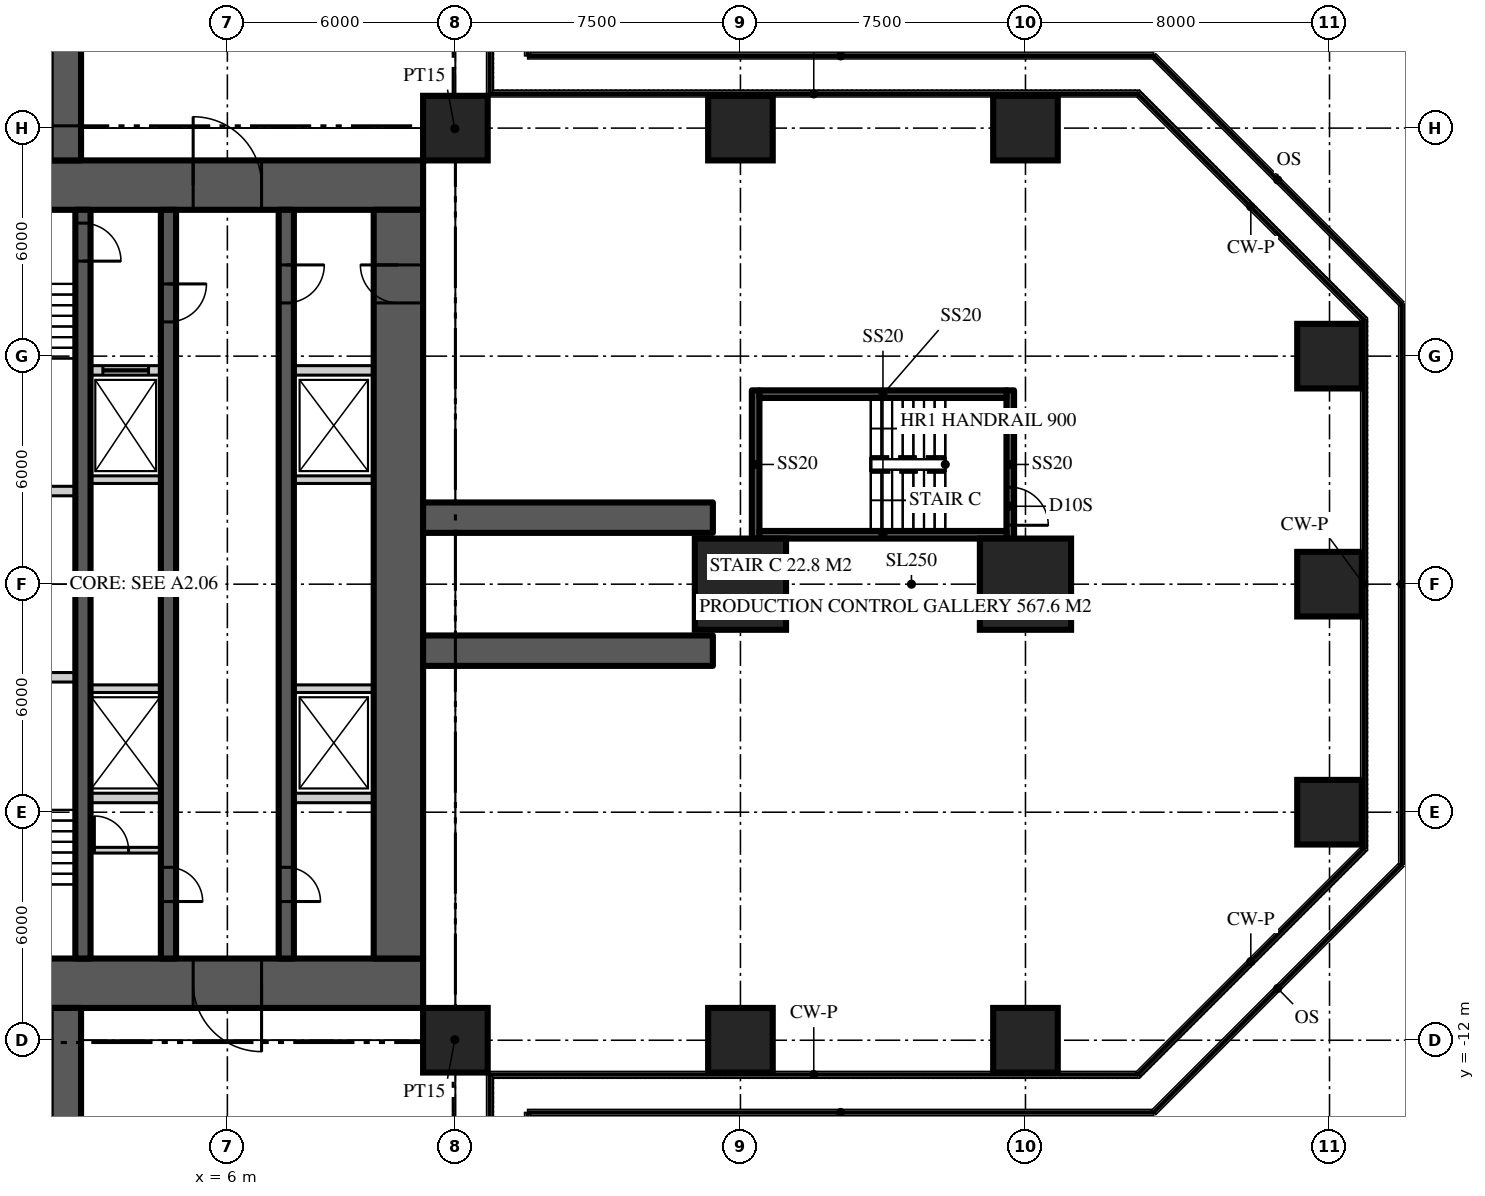
"""IFC4 building model, lengths in metres.
Left out: names, types, materials, properties, quantities, classifications, styles, units other than length and angle.
Written with IfcOpenShell. Run it as: python <this file> out.ifc"""

import sys

from ifc_helpers import new_model, si_unit, direction, frame, frame_2d, origin, origin_2d, place, context, subcontext, project, spatial, rectangle, extrude, element, fill, save


model = new_model("IFC4")
c1 = context("Model", 3, precision=1e-05, world=origin(), true_north=direction((0.0, 1.0)))
c2 = subcontext(c1, "Body", "Model", "MODEL_VIEW")
j1 = project(units=[si_unit("LENGTHUNIT", "METRE"), si_unit("PLANEANGLEUNIT", "RADIAN")], contexts=[c1])
p1 = place(None, origin())
s1 = spatial("IfcSite", under=j1, at=p1, CompositionType="ELEMENT")
p2 = place(p1, origin())
s2 = spatial("IfcBuilding", under=s1, at=p2, CompositionType="ELEMENT")
p3 = place(p2, frame((0.0, 0.0, 23.0)))
s3 = spatial("IfcBuildingStorey", under=s2, at=p3, CompositionType="ELEMENT", Elevation=23.0)
p4 = place(p3, frame((-11.15, 10.5, 0.0), z_axis=(0.0, 0.0, 1.0), x_axis=(1.0, 0.0, 0.0)))
e1 = element("IfcWall", 1, at=p4, inside=s3, PredefinedType="SHEAR", context=c2, shape_type="SweptSolid", body=[
    extrude(rectangle(XDim=22.3, YDim=1.3, at=frame_2d((11.15, 0.0))), origin(), (0.0, 0.0, 1.0), 5.0),
])
p5 = place(p4, frame((4.25, 0.0, 0.0)))
e2 = element("IfcOpeningElement", 2, at=p5, cuts=e1, PredefinedType="OPENING", context=c2, shape_type="SweptSolid", body=[
    extrude(rectangle(XDim=1.8, YDim=2.2, at=frame_2d((0.9, 1.1))), frame((0.0, 0.66, 0.0), z_axis=(0.0, -1.0, 0.0), x_axis=(1.0, 0.0, 0.0)), (0.0, 0.0, 1.0), 1.32),
])
p6 = place(p4, frame((16.25, 0.0, 0.0)))
e3 = element("IfcOpeningElement", 3, at=p6, cuts=e1, PredefinedType="OPENING", context=c2, shape_type="SweptSolid", body=[
    extrude(rectangle(XDim=1.8, YDim=2.2, at=frame_2d((0.9, 1.1))), frame((0.0, 0.66, 0.0), z_axis=(0.0, -1.0, 0.0), x_axis=(1.0, 0.0, 0.0)), (0.0, 0.0, 1.0), 1.32),
])
p7 = place(p3, frame((11.15, -10.5, 0.0), z_axis=(0.0, 0.0, 1.0), x_axis=(-1.0, 0.0, 0.0)))
e4 = element("IfcWall", 4, at=p7, inside=s3, PredefinedType="SHEAR", context=c2, shape_type="SweptSolid", body=[
    extrude(rectangle(XDim=22.3, YDim=1.3, at=frame_2d((11.15, 0.0))), origin(), (0.0, 0.0, 1.0), 5.0),
])
p8 = place(p7, frame((16.25, 0.0, 0.0)))
e5 = element("IfcOpeningElement", 5, at=p8, cuts=e4, PredefinedType="OPENING", context=c2, shape_type="SweptSolid", body=[
    extrude(rectangle(XDim=1.8, YDim=2.2, at=frame_2d((0.9, 1.1))), frame((0.0, 0.66, 0.0), z_axis=(0.0, -1.0, 0.0), x_axis=(1.0, 0.0, 0.0)), (0.0, 0.0, 1.0), 1.32),
])
p9 = place(p7, frame((4.25, 0.0, 0.0)))
e6 = element("IfcOpeningElement", 6, at=p9, cuts=e4, PredefinedType="OPENING", context=c2, shape_type="SweptSolid", body=[
    extrude(rectangle(XDim=1.8, YDim=2.2, at=frame_2d((0.9, 1.1))), frame((0.0, 0.66, 0.0), z_axis=(0.0, -1.0, 0.0), x_axis=(1.0, 0.0, 0.0)), (0.0, 0.0, 1.0), 1.32),
])
p10 = place(p3, frame((10.5, -9.85, 0.0), z_axis=(0.0, 0.0, 1.0), x_axis=(0.0, 1.0, 0.0)))
e7 = element("IfcWall", 7, at=p10, inside=s3, PredefinedType="SHEAR", context=c2, shape_type="SweptSolid", body=[
    extrude(rectangle(XDim=19.7, YDim=1.3, at=frame_2d((9.85, 0.0))), origin(), (0.0, 0.0, 1.0), 5.0),
])
p11 = place(p10, frame((17.25, 0.0, 0.0)))
e8 = element("IfcOpeningElement", 8, at=p11, cuts=e7, PredefinedType="OPENING", context=c2, shape_type="SweptSolid", body=[
    extrude(rectangle(XDim=1.0, YDim=2.2, at=frame_2d((0.5, 1.1))), frame((0.0, 0.66, 0.0), z_axis=(0.0, -1.0, 0.0), x_axis=(1.0, 0.0, 0.0)), (0.0, 0.0, 1.0), 1.32),
])
for number, where, z_axis, x_axis in (
    (9, (11.15, -1.75, 0.0), (0.0, 0.0, 1.0), (1.0, 0.0, 0.0)),
    (10, (11.15, 1.75, 0.0), (0.0, 0.0, 1.0), (1.0, 0.0, 0.0)),
    (11, (1.75, 11.15, 0.0), (0.0, 0.0, 1.0), (0.0, 1.0, 0.0)),
    (12, (1.75, -11.15, 0.0), (0.0, 0.0, 1.0), (0.0, -1.0, 0.0)),
):
    element("IfcWall", number, at=place(p3, frame(where, z_axis=z_axis, x_axis=x_axis)), inside=s3, PredefinedType="SHEAR", context=c2, shape_type="SweptSolid", body=[
        extrude(rectangle(XDim=7.625, YDim=0.8, at=frame_2d((3.812, 0.0))), origin(), (0.0, 0.0, 1.0), 5.0),
    ])
for number, where, z_axis, x_axis in (
    (13, (12.0, -12.0, 0.0), (0.0, 0.0, 1.0), (1.0, 0.0, 0.0)),
    (14, (19.5, -12.0, 0.0), (0.0, 0.0, 1.0), (1.0, 0.0, 0.0)),
    (15, (27.0, -12.0, 0.0), (0.0, 0.0, 1.0), (1.0, 0.0, 0.0)),
    (16, (35.0, -6.0, 0.0), (0.0, 0.0, 1.0), (1.0, 0.0, 0.0)),
):
    element("IfcColumn", number, at=place(p3, frame(where, z_axis=z_axis, x_axis=x_axis)), inside=s3, PredefinedType="COLUMN", context=c2, shape_type="SweptSolid", body=[
        extrude(rectangle(XDim=1.7, YDim=1.7, at=origin_2d()), origin(), (0.0, 0.0, 1.0), 5.0),
    ])
for number, where, z_axis, x_axis in (
    (17, (19.5, 0.0, 0.0), (0.0, 0.0, 1.0), (1.0, 0.0, 0.0)),
    (18, (27.0, 0.0, 0.0), (0.0, 0.0, 1.0), (1.0, 0.0, 0.0)),
):
    element("IfcColumn", number, at=place(p3, frame(where, z_axis=z_axis, x_axis=x_axis)), inside=s3, PredefinedType="COLUMN", context=c2, shape_type="SweptSolid", body=[
        extrude(rectangle(XDim=2.4, YDim=2.4, at=origin_2d()), origin(), (0.0, 0.0, 1.0), 5.0),
    ])
for number, where, z_axis, x_axis in (
    (19, (35.0, 0.0, 0.0), (0.0, 0.0, 1.0), (1.0, 0.0, 0.0)),
    (20, (35.0, 6.0, 0.0), (0.0, 0.0, 1.0), (1.0, 0.0, 0.0)),
    (21, (12.0, 12.0, 0.0), (0.0, 0.0, 1.0), (1.0, 0.0, 0.0)),
    (22, (19.5, 12.0, 0.0), (0.0, 0.0, 1.0), (1.0, 0.0, 0.0)),
    (23, (27.0, 12.0, 0.0), (0.0, 0.0, 1.0), (1.0, 0.0, 0.0)),
):
    element("IfcColumn", number, at=place(p3, frame(where, z_axis=z_axis, x_axis=x_axis)), inside=s3, PredefinedType="COLUMN", context=c2, shape_type="SweptSolid", body=[
        extrude(rectangle(XDim=1.7, YDim=1.7, at=origin_2d()), origin(), (0.0, 0.0, 1.0), 5.0),
    ])
p12 = place(p3, frame((7.55, 9.85, 0.0), z_axis=(0.0, 0.0, 1.0), x_axis=(0.0, -1.0, 0.0)))
e24 = element("IfcWall", 24, at=p12, inside=s3, PredefinedType="SHEAR", context=c2, shape_type="SweptSolid", body=[
    extrude(rectangle(XDim=19.7, YDim=0.4, at=frame_2d((9.85, 0.0))), origin(), (0.0, 0.0, 1.0), 5.0),
])
p13 = place(p12, frame((1.45, 0.0, 0.0)))
e25 = element("IfcOpeningElement", 25, at=p13, cuts=e24, PredefinedType="OPENING", context=c2, shape_type="SweptSolid", body=[
    extrude(rectangle(XDim=1.0, YDim=2.2, at=frame_2d((0.5, 1.1))), frame((0.0, 0.21, 0.0), z_axis=(0.0, -1.0, 0.0), x_axis=(1.0, 0.0, 0.0)), (0.0, 0.0, 1.0), 0.42),
])
p14 = place(p12, frame((17.3, 0.0, 0.0)))
e26 = element("IfcOpeningElement", 26, at=p14, cuts=e24, PredefinedType="OPENING", context=c2, shape_type="SweptSolid", body=[
    extrude(rectangle(XDim=0.9, YDim=2.1, at=frame_2d((0.45, 1.05))), frame((0.0, 0.21, 0.0), z_axis=(0.0, -1.0, 0.0), x_axis=(1.0, 0.0, 0.0)), (0.0, 0.0, 1.0), 0.42),
])
p15 = place(p3, frame((4.45, 9.85, 0.0), z_axis=(0.0, 0.0, 1.0), x_axis=(0.0, -1.0, 0.0)))
e27 = element("IfcWall", 27, at=p15, inside=s3, PredefinedType="SHEAR", context=c2, shape_type="SweptSolid", body=[
    extrude(rectangle(XDim=19.7, YDim=0.4, at=frame_2d((9.85, 0.0))), origin(), (0.0, 0.0, 1.0), 5.0),
])
p16 = place(p15, frame((1.95, 0.0, 0.0)))
e28 = element("IfcOpeningElement", 28, at=p16, cuts=e27, PredefinedType="OPENING", context=c2, shape_type="SweptSolid", body=[
    extrude(rectangle(XDim=1.0, YDim=2.2, at=frame_2d((0.5, 1.1))), frame((0.0, 0.21, 0.0), z_axis=(0.0, -1.0, 0.0), x_axis=(1.0, 0.0, 0.0)), (0.0, 0.0, 1.0), 0.42),
])
p17 = place(p15, frame((17.3, 0.0, 0.0)))
e29 = element("IfcOpeningElement", 29, at=p17, cuts=e27, PredefinedType="OPENING", context=c2, shape_type="SweptSolid", body=[
    extrude(rectangle(XDim=0.9, YDim=2.1, at=frame_2d((0.45, 1.05))), frame((0.0, 0.21, 0.0), z_axis=(0.0, -1.0, 0.0), x_axis=(1.0, 0.0, 0.0)), (0.0, 0.0, 1.0), 0.42),
])
p18 = place(p3, frame((2.2, 9.85, 0.0), z_axis=(0.0, 0.0, 1.0), x_axis=(0.0, -1.0, 0.0)))
e30 = element("IfcWall", 30, at=p18, inside=s3, PredefinedType="SHEAR", context=c2, shape_type="SweptSolid", body=[
    extrude(rectangle(XDim=19.7, YDim=0.4, at=frame_2d((9.85, 0.0))), origin(), (0.0, 0.0, 1.0), 5.0),
])
p19 = place(p18, frame((0.35, 0.0, 0.0)))
e31 = element("IfcOpeningElement", 31, at=p19, cuts=e30, PredefinedType="OPENING", context=c2, shape_type="SweptSolid", body=[
    extrude(rectangle(XDim=1.0, YDim=2.2, at=frame_2d((0.5, 1.1))), frame((0.0, 0.21, 0.0), z_axis=(0.0, -1.0, 0.0), x_axis=(1.0, 0.0, 0.0)), (0.0, 0.0, 1.0), 0.42),
])
p20 = place(p3, frame((2.4, 5.625, 0.0), z_axis=(0.0, 0.0, 1.0), x_axis=(1.0, 0.0, 0.0)))
e32 = element("IfcWall", 32, at=p20, inside=s3, PredefinedType="SOLIDWALL", context=c2, shape_type="SweptSolid", body=[
    extrude(rectangle(XDim=1.85, YDim=0.25, at=frame_2d((0.925, 0.0))), origin(), (0.0, 0.0, 1.0), 4.8),
])
p21 = place(p20, frame((0.325, 0.0, 0.0)))
e33 = element("IfcOpeningElement", 33, at=p21, cuts=e32, PredefinedType="OPENING", context=c2, shape_type="SweptSolid", body=[
    extrude(rectangle(XDim=1.2, YDim=2.2, at=frame_2d((0.6, 1.1))), frame((0.0, 0.135, 0.0), z_axis=(0.0, -1.0, 0.0), x_axis=(1.0, 0.0, 0.0)), (0.0, 0.0, 1.0), 0.27),
])
p22 = place(p3, frame((7.75, 5.625, 0.0), z_axis=(0.0, 0.0, 1.0), x_axis=(1.0, 0.0, 0.0)))
e34 = element("IfcWall", 34, at=p22, inside=s3, PredefinedType="SOLIDWALL", context=c2, shape_type="SweptSolid", body=[
    extrude(rectangle(XDim=2.1, YDim=0.25, at=frame_2d((1.05, 0.0))), origin(), (0.0, 0.0, 1.0), 4.8),
])
p23 = place(p3, frame((2.4, -5.625, 0.0), z_axis=(0.0, 0.0, 1.0), x_axis=(1.0, 0.0, 0.0)))
e35 = element("IfcWall", 35, at=p23, inside=s3, PredefinedType="SOLIDWALL", context=c2, shape_type="SweptSolid", body=[
    extrude(rectangle(XDim=1.85, YDim=0.25, at=frame_2d((0.925, 0.0))), origin(), (0.0, 0.0, 1.0), 4.8),
])
p24 = place(p3, frame((7.75, -5.625, 0.0), z_axis=(0.0, 0.0, 1.0), x_axis=(1.0, 0.0, 0.0)))
e36 = element("IfcWall", 36, at=p24, inside=s3, PredefinedType="SOLIDWALL", context=c2, shape_type="SweptSolid", body=[
    extrude(rectangle(XDim=2.1, YDim=0.25, at=frame_2d((1.05, 0.0))), origin(), (0.0, 0.0, 1.0), 4.8),
])
for number, where, z_axis, x_axis in (
    (37, (-2.0, -2.45, 0.0), (0.0, 0.0, 1.0), (1.0, 0.0, 0.0)),
    (38, (-2.0, 2.45, 0.0), (0.0, 0.0, 1.0), (1.0, 0.0, 0.0)),
):
    element("IfcWall", number, at=place(p3, frame(where, z_axis=z_axis, x_axis=x_axis)), inside=s3, PredefinedType="SOLIDWALL", context=c2, shape_type="SweptSolid", body=[
        extrude(rectangle(XDim=4.0, YDim=0.25, at=frame_2d((2.0, 0.0))), origin(), (0.0, 0.0, 1.0), 4.8),
    ])
p25 = place(p3, frame((2.4, -2.75, 0.0), z_axis=(0.0, 0.0, 1.0), x_axis=(1.0, 0.0, 0.0)))
e39 = element("IfcWall", 39, at=p25, inside=s3, PredefinedType="SOLIDWALL", context=c2, shape_type="SweptSolid", body=[
    extrude(rectangle(XDim=1.85, YDim=0.2, at=frame_2d((0.925, 0.0))), origin(), (0.0, 0.0, 1.0), 4.8),
])
p26 = place(p3, frame((7.75, -2.75, 0.0), z_axis=(0.0, 0.0, 1.0), x_axis=(1.0, 0.0, 0.0)))
e40 = element("IfcWall", 40, at=p26, inside=s3, PredefinedType="SOLIDWALL", context=c2, shape_type="SweptSolid", body=[
    extrude(rectangle(XDim=2.1, YDim=0.2, at=frame_2d((1.05, 0.0))), origin(), (0.0, 0.0, 1.0), 4.8),
])
p27 = place(p3, frame((2.4, 2.75, 0.0), z_axis=(0.0, 0.0, 1.0), x_axis=(1.0, 0.0, 0.0)))
e41 = element("IfcWall", 41, at=p27, inside=s3, PredefinedType="SOLIDWALL", context=c2, shape_type="SweptSolid", body=[
    extrude(rectangle(XDim=1.85, YDim=0.2, at=frame_2d((0.925, 0.0))), origin(), (0.0, 0.0, 1.0), 4.8),
])
p28 = place(p3, frame((7.75, 2.75, 0.0), z_axis=(0.0, 0.0, 1.0), x_axis=(1.0, 0.0, 0.0)))
e42 = element("IfcWall", 42, at=p28, inside=s3, PredefinedType="SOLIDWALL", context=c2, shape_type="SweptSolid", body=[
    extrude(rectangle(XDim=2.1, YDim=0.2, at=frame_2d((1.05, 0.0))), origin(), (0.0, 0.0, 1.0), 4.8),
])
for number, where, z_axis, x_axis in (
    (43, (11.15, 11.15, 0.0), (0.0, 0.0, 1.0), (0.707, 0.707, 0.0)),
    (44, (11.15, -11.15, 0.0), (0.0, 0.0, 1.0), (0.707, -0.707, 0.0)),
):
    element("IfcWall", number, at=place(p3, frame(where, z_axis=z_axis, x_axis=x_axis)), inside=s3, PredefinedType="PARTITIONING", context=c2, shape_type="SweptSolid", body=[
        extrude(rectangle(XDim=2.362, YDim=0.15, at=frame_2d((1.181, 0.0))), origin(), (0.0, 0.0, 1.0), 4.75),
    ])
p29 = place(p3, frame((2.4, -7.0, 0.0), z_axis=(0.0, 0.0, 1.0), x_axis=(1.0, 0.0, 0.0)))
e45 = element("IfcWall", 45, at=p29, inside=s3, PredefinedType="SOLIDWALL", context=c2, shape_type="SweptSolid", body=[
    extrude(rectangle(XDim=1.85, YDim=0.15, at=frame_2d((0.925, 0.0))), origin(), (0.0, 0.0, 1.0), 4.75),
])
p30 = place(p29, frame((0.1, 0.0, 0.0)))
e46 = element("IfcOpeningElement", 46, at=p30, cuts=e45, PredefinedType="OPENING", context=c2, shape_type="SweptSolid", body=[
    extrude(rectangle(XDim=0.9, YDim=2.1, at=frame_2d((0.45, 1.05))), frame((0.0, 0.085, 0.0), z_axis=(0.0, -1.0, 0.0), x_axis=(1.0, 0.0, 0.0)), (0.0, 0.0, 1.0), 0.17),
])
p31 = place(p3, frame((19.9, 1.2, 0.0), z_axis=(0.0, 0.0, 1.0), x_axis=(0.0, 1.0, 0.0)))
e47 = element("IfcWall", 47, at=p31, inside=s3, PredefinedType="SOLIDWALL", context=c2, shape_type="SweptSolid", body=[
    extrude(rectangle(XDim=3.9, YDim=0.2, at=frame_2d((1.95, 0.0))), origin(), (0.0, 0.0, 1.0), 4.75),
])
p32 = place(p3, frame((26.6, 5.1, 0.0), z_axis=(0.0, 0.0, 1.0), x_axis=(0.0, -1.0, 0.0)))
e48 = element("IfcWall", 48, at=p32, inside=s3, PredefinedType="SOLIDWALL", context=c2, shape_type="SweptSolid", body=[
    extrude(rectangle(XDim=3.9, YDim=0.2, at=frame_2d((1.95, 0.0))), origin(), (0.0, 0.0, 1.0), 4.75),
])
p33 = place(p32, frame((2.55, 0.0, 0.0)))
e49 = element("IfcOpeningElement", 49, at=p33, cuts=e48, PredefinedType="OPENING", context=c2, shape_type="SweptSolid", body=[
    extrude(rectangle(XDim=1.0, YDim=2.2, at=frame_2d((0.5, 1.1))), frame((0.0, 0.11, 0.0), z_axis=(0.0, -1.0, 0.0), x_axis=(1.0, 0.0, 0.0)), (0.0, 0.0, 1.0), 0.22),
])
for number, where, z_axis, x_axis in (
    (50, (20.0, 1.3, 0.0), (0.0, 0.0, 1.0), (1.0, 0.0, 0.0)),
    (51, (26.5, 5.0, 0.0), (0.0, 0.0, 1.0), (-1.0, 0.0, 0.0)),
):
    element("IfcWall", number, at=place(p3, frame(where, z_axis=z_axis, x_axis=x_axis)), inside=s3, PredefinedType="SOLIDWALL", context=c2, shape_type="SweptSolid", body=[
        extrude(rectangle(XDim=6.5, YDim=0.2, at=frame_2d((3.25, 0.0))), origin(), (0.0, 0.0, 1.0), 4.75),
    ])
p34 = place(p6, origin())
e52 = element("IfcDoor", 52, at=p34, inside=s3, OperationType="DOUBLE_DOOR_DOUBLE_SWING", PredefinedType="DOOR", context=c2, shape_type="SweptSolid", body=[
    extrude(rectangle(XDim=1.8, YDim=2.2, at=frame_2d((0.9, 1.1))), frame((0.0, 0.025, 0.0), z_axis=(0.0, -1.0, 0.0), x_axis=(1.0, 0.0, 0.0)), (0.0, 0.0, 1.0), 0.05),
])
fill(e3, e52)
p35 = place(p9, origin())
e53 = element("IfcDoor", 53, at=p35, inside=s3, OperationType="DOUBLE_DOOR_DOUBLE_SWING", PredefinedType="DOOR", context=c2, shape_type="SweptSolid", body=[
    extrude(rectangle(XDim=1.8, YDim=2.2, at=frame_2d((0.9, 1.1))), frame((0.0, 0.025, 0.0), z_axis=(0.0, -1.0, 0.0), x_axis=(1.0, 0.0, 0.0)), (0.0, 0.0, 1.0), 0.05),
])
fill(e6, e53)
p36 = place(p13, origin())
e54 = element("IfcDoor", 54, at=p36, inside=s3, OperationType="SINGLE_SWING_LEFT", PredefinedType="DOOR", context=c2, shape_type="SweptSolid", body=[
    extrude(rectangle(XDim=1.0, YDim=2.2, at=frame_2d((0.5, 1.1))), frame((0.0, 0.025, 0.0), z_axis=(0.0, -1.0, 0.0), x_axis=(1.0, 0.0, 0.0)), (0.0, 0.0, 1.0), 0.05),
])
fill(e25, e54)
p37 = place(p11, origin())
e55 = element("IfcDoor", 55, at=p37, inside=s3, OperationType="SINGLE_SWING_RIGHT", PredefinedType="DOOR", context=c2, shape_type="SweptSolid", body=[
    extrude(rectangle(XDim=1.0, YDim=2.2, at=frame_2d((0.5, 1.1))), frame((0.0, 0.025, 0.0), z_axis=(0.0, -1.0, 0.0), x_axis=(1.0, 0.0, 0.0)), (0.0, 0.0, 1.0), 0.05),
])
fill(e8, e55)
p38 = place(p16, origin())
e56 = element("IfcDoor", 56, at=p38, inside=s3, OperationType="SINGLE_SWING_LEFT", PredefinedType="DOOR", context=c2, shape_type="SweptSolid", body=[
    extrude(rectangle(XDim=1.0, YDim=2.2, at=frame_2d((0.5, 1.1))), frame((0.0, 0.025, 0.0), z_axis=(0.0, -1.0, 0.0), x_axis=(1.0, 0.0, 0.0)), (0.0, 0.0, 1.0), 0.05),
])
fill(e28, e56)
p39 = place(p19, origin())
e57 = element("IfcDoor", 57, at=p39, inside=s3, OperationType="SINGLE_SWING_RIGHT", PredefinedType="DOOR", context=c2, shape_type="SweptSolid", body=[
    extrude(rectangle(XDim=1.0, YDim=2.2, at=frame_2d((0.5, 1.1))), frame((0.0, 0.025, 0.0), z_axis=(0.0, -1.0, 0.0), x_axis=(1.0, 0.0, 0.0)), (0.0, 0.0, 1.0), 0.05),
])
fill(e31, e57)
p40 = place(p14, origin())
e58 = element("IfcDoor", 58, at=p40, inside=s3, OperationType="SINGLE_SWING_RIGHT", PredefinedType="DOOR", context=c2, shape_type="SweptSolid", body=[
    extrude(rectangle(XDim=0.9, YDim=2.1, at=frame_2d((0.45, 1.05))), frame((0.0, 0.025, 0.0), z_axis=(0.0, -1.0, 0.0), x_axis=(1.0, 0.0, 0.0)), (0.0, 0.0, 1.0), 0.05),
])
fill(e26, e58)
p41 = place(p17, origin())
e59 = element("IfcDoor", 59, at=p41, inside=s3, OperationType="SINGLE_SWING_RIGHT", PredefinedType="DOOR", context=c2, shape_type="SweptSolid", body=[
    extrude(rectangle(XDim=0.9, YDim=2.1, at=frame_2d((0.45, 1.05))), frame((0.0, 0.025, 0.0), z_axis=(0.0, -1.0, 0.0), x_axis=(1.0, 0.0, 0.0)), (0.0, 0.0, 1.0), 0.05),
])
fill(e29, e59)
p42 = place(p21, origin())
e60 = element("IfcDoor", 60, at=p42, inside=s3, OperationType="SLIDING_TO_LEFT", PredefinedType="DOOR", context=c2, shape_type="SweptSolid", body=[
    extrude(rectangle(XDim=1.2, YDim=2.2, at=frame_2d((0.6, 1.1))), frame((0.0, 0.025, 0.0), z_axis=(0.0, -1.0, 0.0), x_axis=(1.0, 0.0, 0.0)), (0.0, 0.0, 1.0), 0.05),
])
fill(e33, e60)
p43 = place(p30, origin())
e61 = element("IfcDoor", 61, at=p43, inside=s3, OperationType="SINGLE_SWING_LEFT", PredefinedType="DOOR", context=c2, shape_type="SweptSolid", body=[
    extrude(rectangle(XDim=0.9, YDim=2.1, at=frame_2d((0.45, 1.05))), frame((0.0, 0.025, 0.0), z_axis=(0.0, -1.0, 0.0), x_axis=(1.0, 0.0, 0.0)), (0.0, 0.0, 1.0), 0.05),
])
fill(e46, e61)
p44 = place(p33, origin())
e62 = element("IfcDoor", 62, at=p44, inside=s3, OperationType="SINGLE_SWING_RIGHT", PredefinedType="DOOR", context=c2, shape_type="SweptSolid", body=[
    extrude(rectangle(XDim=1.0, YDim=2.2, at=frame_2d((0.5, 1.1))), frame((0.0, 0.025, 0.0), z_axis=(0.0, -1.0, 0.0), x_axis=(1.0, 0.0, 0.0)), (0.0, 0.0, 1.0), 0.05),
])
fill(e49, e62)
save(model, sys.argv[1])
